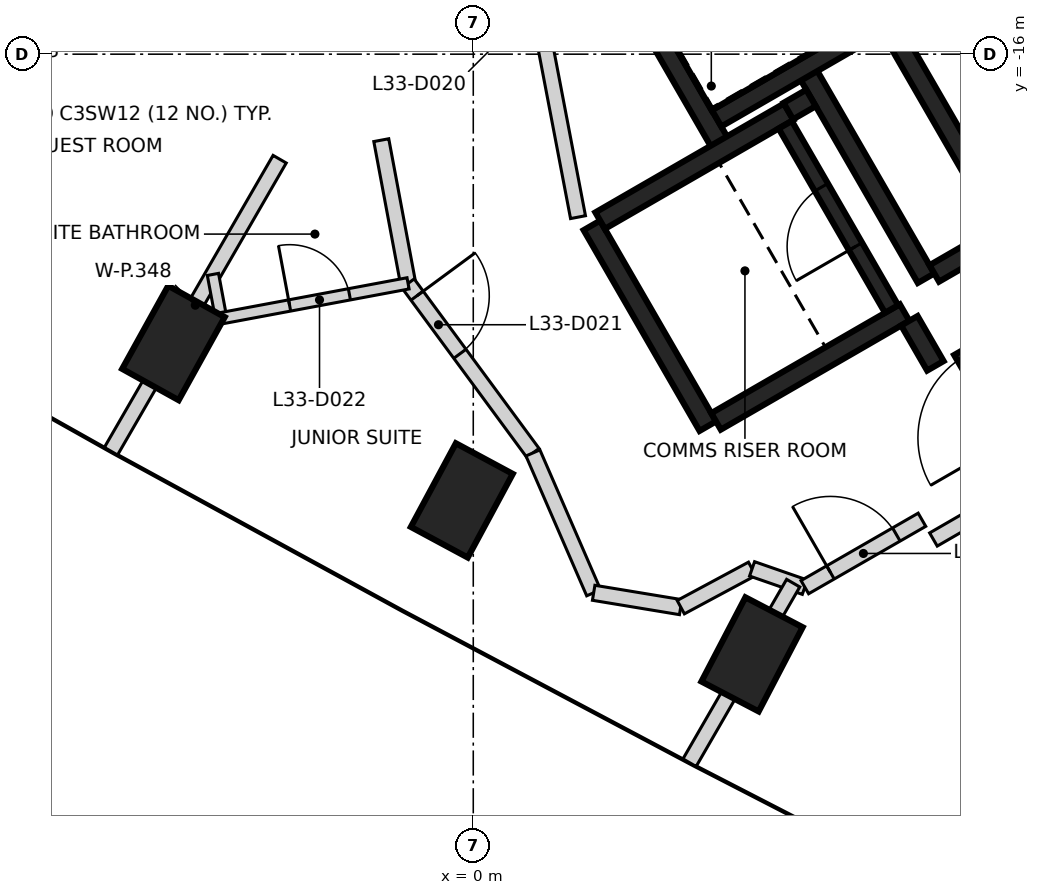
"""IFC4 building model, lengths in metres.
Left out: names, types, materials, properties, quantities, classifications, styles, units other than length and angle.
Written with IfcOpenShell. Run it as: python <this file> out.ifc"""

import sys

from ifc_helpers import new_model, si_unit, direction, frame, frame_2d, origin, origin_2d, place, context, subcontext, project, spatial, rectangle, extrude, element, fill, save


model = new_model("IFC4")
c1 = context("Model", 3, precision=1e-05, world=origin(), true_north=direction((0.0, 1.0)))
c2 = subcontext(c1, "Body", "Model", "MODEL_VIEW")
j1 = project(units=[si_unit("LENGTHUNIT", "METRE"), si_unit("PLANEANGLEUNIT", "RADIAN")], contexts=[c1])
p1 = place(None, origin())
s1 = spatial("IfcSite", under=j1, at=p1, CompositionType="ELEMENT")
p2 = place(p1, origin())
s2 = spatial("IfcBuilding", under=s1, at=p2, CompositionType="ELEMENT")
p3 = place(p2, frame((0.0, 0.0, 136.0)))
s3 = spatial("IfcBuildingStorey", under=s2, at=p3, CompositionType="ELEMENT", Elevation=136.0)
for number, where, z_axis, x_axis in (
    (1, (-3.945, -19.8, -0.4), (0.0, 0.0, 1.0), (0.485, 0.875, 0.0)),
    (2, (-0.151, -21.871, -0.4), (0.0, 0.0, 1.0), (0.474, 0.881, 0.0)),
    (3, (3.667, -23.896, -0.4), (0.0, 0.0, 1.0), (0.463, 0.886, 0.0)),
):
    element("IfcColumn", number, at=place(p3, frame(where, z_axis=z_axis, x_axis=x_axis)), inside=s3, PredefinedType="COLUMN", context=c2, shape_type="SweptSolid", body=[
        extrude(rectangle(XDim=1.25, YDim=0.85, at=origin_2d()), origin(), (0.0, 0.0, 1.0), 3.6),
    ])
p4 = place(p3, frame((3.235, -17.153, 0.0), z_axis=(0.0, 0.0, 1.0), x_axis=(-0.500008851346, 0.866020293397, 0.0)))
e4 = element("IfcWall", 4, at=p4, inside=s3, PredefinedType="SHEAR", context=c2, shape_type="SweptSolid", body=[
    extrude(rectangle(XDim=5.51, YDim=0.25, at=frame_2d((2.755, 0.0))), origin(), (0.0, 0.0, 1.0), 3.2),
])
p5 = place(p3, frame((7.031, -18.327, 0.0), z_axis=(0.0, 0.0, 1.0), x_axis=(-0.499971222258, 0.866042017984, 0.0)))
e5 = element("IfcWall", 5, at=p5, inside=s3, PredefinedType="SHEAR", context=c2, shape_type="SweptSolid", body=[
    extrude(rectangle(XDim=3.2, YDim=0.25, at=frame_2d((1.6, 0.0))), origin(), (0.0, 0.0, 1.0), 3.2),
])
p6 = place(p3, frame((3.085, -20.894, 0.0), z_axis=(0.0, 0.0, 1.0), x_axis=(-0.499978833458, 0.866037623948, 0.0)))
e6 = element("IfcWall", 6, at=p6, inside=s3, PredefinedType="SHEAR", context=c2, shape_type="SweptSolid", body=[
    extrude(rectangle(XDim=3.05, YDim=0.25, at=frame_2d((1.525, 0.0))), origin(), (0.0, 0.0, 1.0), 3.2),
])
p7 = place(p3, frame((1.669, -18.19, 0.0), z_axis=(0.0, 0.0, 1.0), x_axis=(0.866042235819, 0.499970844928, 0.0)))
e7 = element("IfcWall", 7, at=p7, inside=s3, PredefinedType="SHEAR", context=c2, shape_type="SweptSolid", body=[
    extrude(rectangle(XDim=2.865, YDim=0.25, at=frame_2d((1.432, 0.0))), origin(), (0.0, 0.0, 1.0), 3.2),
])
p8 = place(p3, frame((5.675, -19.399, 0.0), z_axis=(0.0, 0.0, 1.0), x_axis=(-0.866026637627, -0.499997862916, 0.0)))
e8 = element("IfcWall", 8, at=p8, inside=s3, PredefinedType="SHEAR", context=c2, shape_type="SweptSolid", body=[
    extrude(rectangle(XDim=2.865, YDim=0.25, at=frame_2d((1.432, 0.0))), origin(), (0.0, 0.0, 1.0), 3.2),
])
p9 = place(p3, frame((4.414, -16.276, 0.0), z_axis=(0.0, 0.0, 1.0), x_axis=(0.500003324108, -0.866023484601, 0.0)))
e9 = element("IfcWall", 9, at=p9, inside=s3, PredefinedType="SHEAR", context=c2, shape_type="SweptSolid", body=[
    extrude(rectangle(XDim=3.085, YDim=0.25, at=frame_2d((1.542, 0.0))), origin(), (0.0, 0.0, 1.0), 3.2),
])
p10 = place(p3, frame((5.322, -15.619, 0.0), z_axis=(0.0, 0.0, 1.0), x_axis=(-0.866026229868, -0.499998569178, 0.0)))
e10 = element("IfcWall", 10, at=p10, inside=s3, PredefinedType="SHEAR", context=c2, shape_type="SweptSolid", body=[
    extrude(rectangle(XDim=2.449, YDim=0.25, at=frame_2d((1.225, 0.0))), origin(), (0.0, 0.0, 1.0), 3.2),
])
p11 = place(p3, frame((7.367, -21.51, 0.0), z_axis=(0.0, 0.0, 1.0), x_axis=(-0.499983108224, 0.866035156036, 0.0)))
e11 = element("IfcWall", 11, at=p11, inside=s3, PredefinedType="SHEAR", context=c2, shape_type="SweptSolid", body=[
    extrude(rectangle(XDim=1.865, YDim=0.25, at=frame_2d((0.932, 0.0))), origin(), (0.0, 0.0, 1.0), 3.2),
])
p12 = place(p11, frame((0.535, 0.0, 0.0)))
e12 = element("IfcOpeningElement", 12, at=p12, cuts=e11, PredefinedType="OPENING", context=c2, shape_type="SweptSolid", body=[
    extrude(rectangle(XDim=1.25, YDim=2.1, at=frame_2d((0.625, 1.05))), frame((0.0, 0.135, 0.0), z_axis=(0.0, -1.0, 0.0), x_axis=(1.0, 0.0, 0.0)), (0.0, 0.0, 1.0), 0.27),
])
p13 = place(p3, frame((6.065, -18.885, 0.0), z_axis=(0.0, 0.0, 1.0), x_axis=(0.866017078145, 0.500014420154, 0.0)))
e13 = element("IfcWall", 13, at=p13, inside=s3, PredefinedType="SHEAR", context=c2, shape_type="SweptSolid", body=[
    extrude(rectangle(XDim=0.989, YDim=0.25, at=frame_2d((0.495, 0.0))), origin(), (0.0, 0.0, 1.0), 3.2),
])
p14 = place(p3, frame((6.08, -20.1, 0.0), z_axis=(0.0, 0.0, 1.0), x_axis=(-0.500051773299, 0.865995510393, 0.0)))
e14 = element("IfcWall", 14, at=p14, inside=s3, PredefinedType="SHEAR", context=c2, shape_type="SweptSolid", body=[
    extrude(rectangle(XDim=0.685, YDim=0.25, at=frame_2d((0.342, 0.0))), origin(), (0.0, 0.0, 1.0), 3.2),
])
p15 = place(p3, frame((4.145, -16.749, 0.0), z_axis=(0.0, 0.0, 1.0), x_axis=(0.866185586049, 0.49972245349, 0.0)))
e15 = element("IfcWall", 15, at=p15, inside=s3, PredefinedType="SHEAR", context=c2, shape_type="SweptSolid", body=[
    extrude(rectangle(XDim=0.344, YDim=0.25, at=frame_2d((0.172, 0.0))), origin(), (0.0, 0.0, 1.0), 3.2),
])
p16 = place(p3, frame((5.503, -19.352, 0.0), z_axis=(0.0, 0.0, 1.0), x_axis=(-0.499986818241, 0.866033014143, 0.0)))
e16 = element("IfcWall", 16, at=p16, inside=s3, PredefinedType="SHEAR", context=c2, shape_type="SweptSolid", body=[
    extrude(rectangle(XDim=2.798, YDim=0.2, at=frame_2d((1.399, 0.0))), origin(), (0.0, 0.0, 1.0), 3.2),
])
p17 = place(p16, frame((0.949, 0.0, 0.0)))
e17 = element("IfcOpeningElement", 17, at=p17, cuts=e16, PredefinedType="OPENING", context=c2, shape_type="SweptSolid", body=[
    extrude(rectangle(XDim=0.9, YDim=2.1, at=frame_2d((0.45, 1.05))), frame((0.0, 0.11, 0.0), z_axis=(0.0, -1.0, 0.0), x_axis=(1.0, 0.0, 0.0)), (0.0, 0.0, 1.0), 0.22),
])
p18 = place(p3, frame((-1.21, -17.131, 0.0), z_axis=(0.0, 0.0, 1.0), x_axis=(0.183950101319, -0.982935582948, 0.0)))
e18 = element("IfcWall", 18, at=p18, inside=s3, PredefinedType="PARTITIONING", context=c2, shape_type="SweptSolid", body=[
    extrude(rectangle(XDim=1.917, YDim=0.2, at=frame_2d((0.958, 0.0))), origin(), (0.0, 0.0, 1.0), 3.2),
])
p19 = place(p3, frame((-0.858, -19.016, 0.0), z_axis=(0.0, 0.0, 1.0), x_axis=(0.593123867414, -0.805111220829, 0.0)))
e19 = element("IfcWall", 19, at=p19, inside=s3, PredefinedType="PARTITIONING", context=c2, shape_type="SweptSolid", body=[
    extrude(rectangle(XDim=2.77, YDim=0.2, at=frame_2d((1.385, 0.0))), origin(), (0.0, 0.0, 1.0), 3.2),
])
p20 = place(p19, frame((0.2, 0.0, 0.0)))
e20 = element("IfcOpeningElement", 20, at=p20, cuts=e19, PredefinedType="OPENING", context=c2, shape_type="SweptSolid", body=[
    extrude(rectangle(XDim=0.95, YDim=2.1, at=frame_2d((0.475, 1.05))), frame((0.0, 0.11, 0.0), z_axis=(0.0, -1.0, 0.0), x_axis=(1.0, 0.0, 0.0)), (0.0, 0.0, 1.0), 0.22),
])
p21 = place(p3, frame((0.289, -12.445, 0.0), z_axis=(0.0, 0.0, 1.0), x_axis=(0.187668946952, -0.982232338273, 0.0)))
e21 = element("IfcWall", 21, at=p21, inside=s3, PredefinedType="PARTITIONING", context=c2, shape_type="SweptSolid", body=[
    extrude(rectangle(XDim=5.802, YDim=0.2, at=frame_2d((2.901, 0.0))), origin(), (0.0, 0.0, 1.0), 3.2),
])
p22 = place(p21, frame((2.433, 0.0, 0.0)))
e22 = element("IfcOpeningElement", 22, at=p22, cuts=e21, PredefinedType="OPENING", context=c2, shape_type="SweptSolid", body=[
    extrude(rectangle(XDim=1.0, YDim=2.1, at=frame_2d((0.5, 1.05))), frame((0.0, 0.11, 0.0), z_axis=(0.0, -1.0, 0.0), x_axis=(1.0, 0.0, 0.0)), (0.0, 0.0, 1.0), 0.22),
])
p23 = place(p3, frame((0.785, -21.246, 0.0), z_axis=(0.0, 0.0, 1.0), x_axis=(0.398365586627, -0.917226721913, 0.0)))
e23 = element("IfcWall", 23, at=p23, inside=s3, PredefinedType="PARTITIONING", context=c2, shape_type="SweptSolid", body=[
    extrude(rectangle(XDim=2.006, YDim=0.2, at=frame_2d((1.003, 0.0))), origin(), (0.0, 0.0, 1.0), 2.3),
])
p24 = place(p3, frame((1.584, -23.086, 0.0), z_axis=(0.0, 0.0, 1.0), x_axis=(0.986654221629, -0.162829502674, 0.0)))
e24 = element("IfcWall", 24, at=p24, inside=s3, PredefinedType="PARTITIONING", context=c2, shape_type="SweptSolid", body=[
    extrude(rectangle(XDim=1.16, YDim=0.2, at=frame_2d((0.58, 0.0))), origin(), (0.0, 0.0, 1.0), 2.3),
])
p25 = place(p3, frame((2.73, -23.275, 0.0), z_axis=(0.0, 0.0, 1.0), x_axis=(0.880927165636, 0.473251866182, 0.0)))
e25 = element("IfcWall", 25, at=p25, inside=s3, PredefinedType="PARTITIONING", context=c2, shape_type="SweptSolid", body=[
    extrude(rectangle(XDim=1.065, YDim=0.2, at=frame_2d((0.532, 0.0))), origin(), (0.0, 0.0, 1.0), 3.2),
])
p26 = place(p3, frame((3.668, -22.771, 0.0), z_axis=(0.0, 0.0, 1.0), x_axis=(0.944447470761, -0.328662402738, 0.0)))
e26 = element("IfcWall", 26, at=p26, inside=s3, PredefinedType="PARTITIONING", context=c2, shape_type="SweptSolid", body=[
    extrude(rectangle(XDim=0.735, YDim=0.2, at=frame_2d((0.367, 0.0))), origin(), (0.0, 0.0, 1.0), 3.2),
])
p27 = place(p3, frame((4.362, -23.012, 0.0), z_axis=(0.0, 0.0, 1.0), x_axis=(0.866692617793, 0.49884256661, 0.0)))
e27 = element("IfcWall", 27, at=p27, inside=s3, PredefinedType="PARTITIONING", context=c2, shape_type="SweptSolid", body=[
    extrude(rectangle(XDim=1.778, YDim=0.2, at=frame_2d((0.889, 0.0))), origin(), (0.0, 0.0, 1.0), 3.2),
])
p28 = place(p27, frame((0.389, 0.0, 0.0)))
e28 = element("IfcOpeningElement", 28, at=p28, cuts=e27, PredefinedType="OPENING", context=c2, shape_type="SweptSolid", body=[
    extrude(rectangle(XDim=1.0, YDim=2.1, at=frame_2d((0.5, 1.05))), frame((0.0, 0.11, 0.0), z_axis=(0.0, -1.0, 0.0), x_axis=(1.0, 0.0, 0.0)), (0.0, 0.0, 1.0), 0.22),
])
p29 = place(p3, frame((6.054, -22.385, 0.0), z_axis=(0.0, 0.0, 1.0), x_axis=(0.86593101922, 0.500163443238, 0.0)))
e29 = element("IfcWall", 29, at=p29, inside=s3, PredefinedType="PARTITIONING", context=c2, shape_type="SweptSolid", body=[
    extrude(rectangle(XDim=1.39, YDim=0.2, at=frame_2d((0.695, 0.0))), origin(), (0.0, 0.0, 1.0), 3.2),
])
p30 = place(p3, frame((-8.535, -19.107, 0.0), z_axis=(0.0, 0.0, 1.0), x_axis=(0.500028565219, 0.866008911019, 0.0)))
e30 = element("IfcWall", 30, at=p30, inside=s3, PredefinedType="PARTITIONING", context=c2, shape_type="SweptSolid", body=[
    extrude(rectangle(XDim=7.824, YDim=0.2, at=frame_2d((3.912, 0.0))), origin(), (0.0, 0.0, 1.0), 3.2),
])
p31 = place(p3, frame((-4.767, -21.223, 0.0), z_axis=(0.0, 0.0, 1.0), x_axis=(0.500305100915, 0.865849182017, 0.0)))
e31 = element("IfcWall", 31, at=p31, inside=s3, PredefinedType="PARTITIONING", context=c2, shape_type="SweptSolid", body=[
    extrude(rectangle(XDim=4.437, YDim=0.2, at=frame_2d((2.218, 0.0))), origin(), (0.0, 0.0, 1.0), 3.2),
])
p32 = place(p3, frame((2.845, -25.321, 0.0), z_axis=(0.0, 0.0, 1.0), x_axis=(0.499942002849, 0.866058885866, 0.0)))
e32 = element("IfcWall", 32, at=p32, inside=s3, PredefinedType="PARTITIONING", context=c2, shape_type="SweptSolid", body=[
    extrude(rectangle(XDim=2.727, YDim=0.2, at=frame_2d((1.364, 0.0))), origin(), (0.0, 0.0, 1.0), 3.2),
])
p33 = place(p3, frame((-3.425, -18.897, 0.0), z_axis=(0.0, 0.0, 1.0), x_axis=(0.183861553242, -0.982952150025, 0.0)))
e33 = element("IfcWall", 33, at=p33, inside=s3, PredefinedType="PARTITIONING", context=c2, shape_type="SweptSolid", body=[
    extrude(rectangle(XDim=0.587, YDim=0.15, at=frame_2d((0.293, 0.0))), origin(), (0.0, 0.0, 1.0), 3.2),
])
p34 = place(p3, frame((-3.315, -19.474, 0.0), z_axis=(0.0, 0.0, 1.0), x_axis=(0.982978173855, 0.183722371326, 0.0)))
e34 = element("IfcWall", 34, at=p34, inside=s3, PredefinedType="PARTITIONING", context=c2, shape_type="SweptSolid", body=[
    extrude(rectangle(XDim=2.5, YDim=0.15, at=frame_2d((1.25, 0.0))), origin(), (0.0, 0.0, 1.0), 3.2),
])
p35 = place(p34, frame((0.915, 0.0, 0.0)))
e35 = element("IfcOpeningElement", 35, at=p35, cuts=e34, PredefinedType="OPENING", context=c2, shape_type="SweptSolid", body=[
    extrude(rectangle(XDim=0.8, YDim=2.1, at=frame_2d((0.4, 1.05))), frame((0.0, 0.085, 0.0), z_axis=(0.0, -1.0, 0.0), x_axis=(1.0, 0.0, 0.0)), (0.0, 0.0, 1.0), 0.17),
])
p36 = place(p17, origin())
e36 = element("IfcDoor", 36, at=p36, inside=s3, OperationType="SINGLE_SWING_LEFT", PredefinedType="DOOR", context=c2, shape_type="SweptSolid", body=[
    extrude(rectangle(XDim=0.9, YDim=2.1, at=frame_2d((0.45, 1.05))), frame((0.0, 0.025, 0.0), z_axis=(0.0, -1.0, 0.0), x_axis=(1.0, 0.0, 0.0)), (0.0, 0.0, 1.0), 0.05),
])
fill(e17, e36)
p37 = place(p20, frame((0.95, 0.0, 0.0), z_axis=(0.0, 0.0, 1.0), x_axis=(-1.0, 0.0, 0.0)))
e37 = element("IfcDoor", 37, at=p37, inside=s3, OperationType="SINGLE_SWING_LEFT", PredefinedType="DOOR", context=c2, shape_type="SweptSolid", body=[
    extrude(rectangle(XDim=0.95, YDim=2.1, at=frame_2d((0.475, 1.05))), frame((0.0, 0.025, 0.0), z_axis=(0.0, -1.0, 0.0), x_axis=(1.0, 0.0, 0.0)), (0.0, 0.0, 1.0), 0.05),
])
fill(e20, e37)
p38 = place(p35, frame((0.8, 0.0, 0.0), z_axis=(0.0, 0.0, 1.0), x_axis=(-1.0, 0.0, 0.0)))
e38 = element("IfcDoor", 38, at=p38, inside=s3, OperationType="SINGLE_SWING_LEFT", PredefinedType="DOOR", context=c2, shape_type="SweptSolid", body=[
    extrude(rectangle(XDim=0.8, YDim=2.1, at=frame_2d((0.4, 1.05))), frame((0.0, 0.025, 0.0), z_axis=(0.0, -1.0, 0.0), x_axis=(1.0, 0.0, 0.0)), (0.0, 0.0, 1.0), 0.05),
])
fill(e35, e38)
p39 = place(p28, frame((1.0, 0.0, 0.0), z_axis=(0.0, 0.0, 1.0), x_axis=(-1.0, 0.0, 0.0)))
e39 = element("IfcDoor", 39, at=p39, inside=s3, OperationType="SINGLE_SWING_LEFT", PredefinedType="DOOR", context=c2, shape_type="SweptSolid", body=[
    extrude(rectangle(XDim=1.0, YDim=2.1, at=frame_2d((0.5, 1.05))), frame((0.0, 0.025, 0.0), z_axis=(0.0, -1.0, 0.0), x_axis=(1.0, 0.0, 0.0)), (0.0, 0.0, 1.0), 0.05),
])
fill(e28, e39)
save(model, sys.argv[1])
